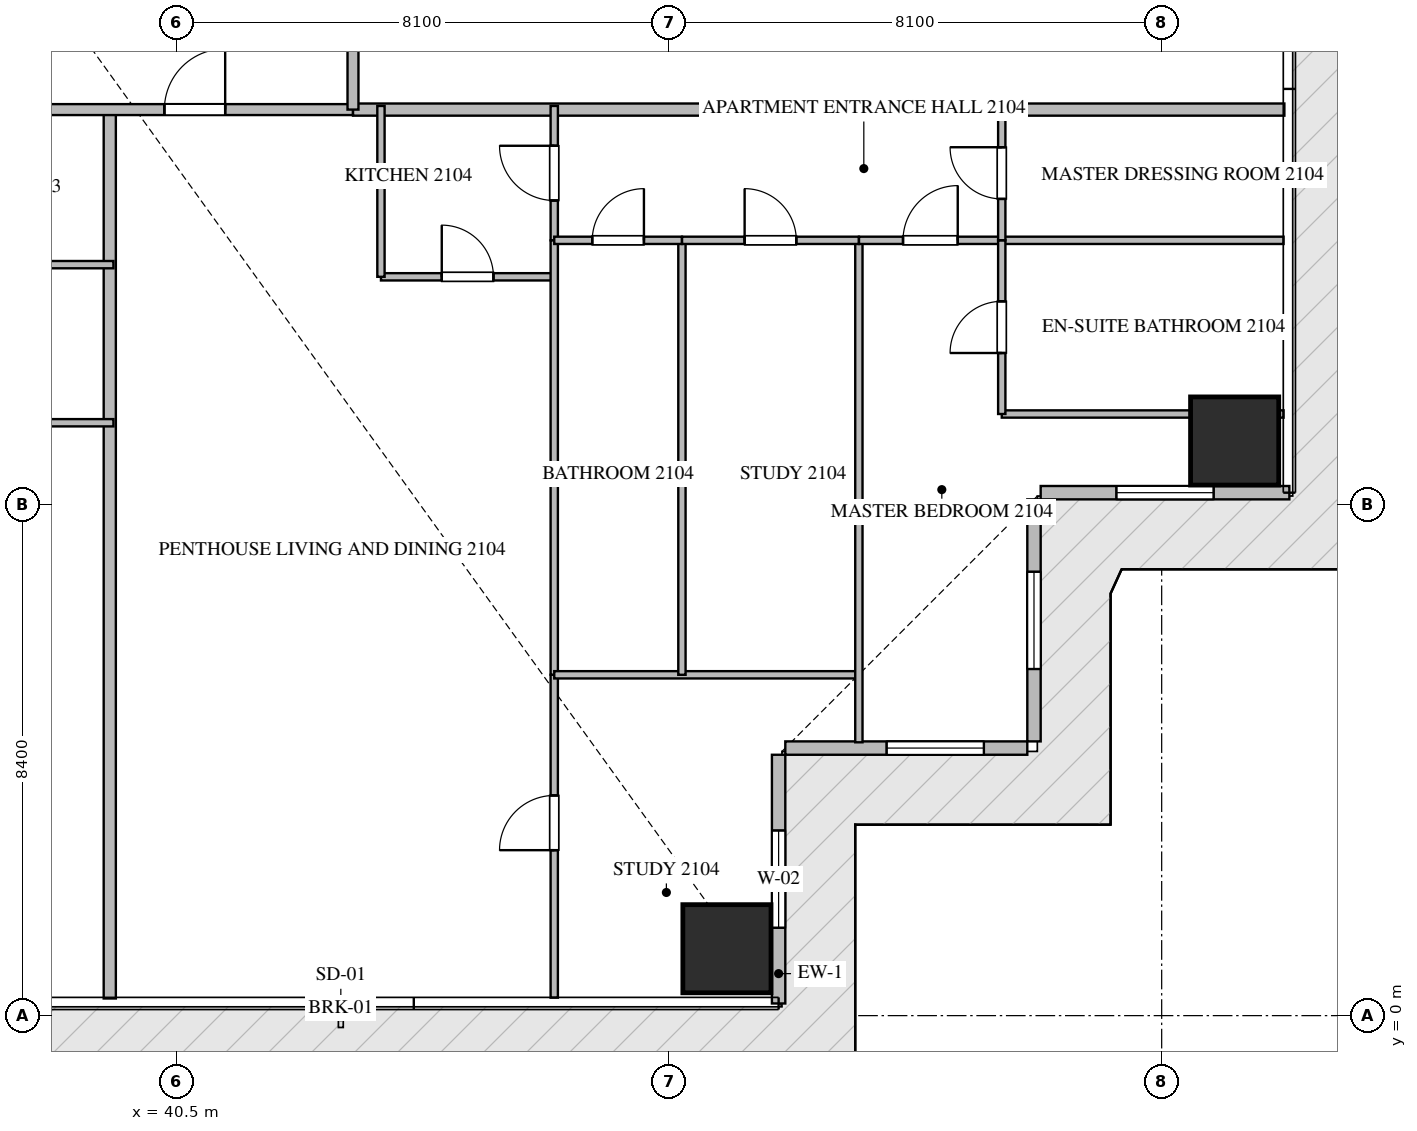
"""IFC4 building model, lengths in metres.
Left out: names, types, materials, properties, quantities, classifications, styles, units other than length and angle.
Written with IfcOpenShell. Run it as: python <this file> out.ifc"""

import sys

from ifc_helpers import new_model, si_unit, direction, frame, frame_2d, origin, origin_2d, place, context, subcontext, project, spatial, rectangle, extrude, source, transform, mapped, element, fill, save


model = new_model("IFC4")
c1 = context("Model", 3, precision=1e-05, world=origin(), true_north=direction((0.0, 1.0)))
c2 = subcontext(c1, "Body", "Model", "MODEL_VIEW")
j1 = project(units=[si_unit("LENGTHUNIT", "METRE"), si_unit("PLANEANGLEUNIT", "RADIAN")], contexts=[c1])
p1 = place(None, origin())
s1 = spatial("IfcSite", under=j1, at=p1, CompositionType="ELEMENT")
p2 = place(p1, origin())
s2 = spatial("IfcBuilding", under=s1, at=p2, CompositionType="ELEMENT")
p3 = place(p2, frame((0.0, 0.0, 86.7)))
s3 = spatial("IfcBuildingStorey", under=s2, at=p3, CompositionType="ELEMENT", Elevation=86.7)
m1 = source(origin(), c2, "Body", "SweptSolid", [
    extrude(rectangle(XDim=1.45, YDim=1.45, at=origin_2d()), origin(), (0.0, 0.0, 1.0), 3.75),
])
for number, where, z_axis, x_axis in (
    (1, (49.55, 1.1, -0.26), (0.0, 0.0, 1.0), (1.0, 0.0, 0.0)),
    (2, (57.9, 9.45, -0.26), (0.0, 0.0, 1.0), (1.0, 0.0, 0.0)),
):
    element("IfcColumn", number, at=place(p3, frame(where, z_axis=z_axis, x_axis=x_axis)), inside=s3, PredefinedType="COLUMN", context=c2, shape_type="MappedRepresentation", body=[
        mapped(m1, transform((0.0, 0.0, 0.0), scale=1.0)),
    ])
p4 = place(p3, frame((50.4, 0.2, 0.0), z_axis=(0.0, 0.0, 1.0), x_axis=(0.0, 1.0, 0.0)))
e3 = element("IfcWall", 3, at=p4, inside=s3, PredefinedType="ELEMENTEDWALL", context=c2, shape_type="SweptSolid", body=[
    extrude(rectangle(XDim=4.09, YDim=0.22, at=frame_2d((2.045, 0.0))), origin(), (0.0, 0.0, 1.0), 3.475),
])
p5 = place(p4, frame((1.245, 0.0, 0.65)))
e4 = element("IfcOpeningElement", 4, at=p5, cuts=e3, PredefinedType="OPENING", context=c2, shape_type="SweptSolid", body=[
    extrude(rectangle(XDim=1.6, YDim=2.1, at=frame_2d((0.8, 1.05))), frame((0.0, 0.12, 0.0), z_axis=(0.0, -1.0, 0.0), x_axis=(1.0, 0.0, 0.0)), (0.0, 0.0, 1.0), 0.24),
])
p6 = place(p3, frame((50.51, 4.4, 0.0), z_axis=(0.0, 0.0, 1.0), x_axis=(1.0, 0.0, 0.0)))
e5 = element("IfcWall", 5, at=p6, inside=s3, PredefinedType="ELEMENTEDWALL", context=c2, shape_type="SweptSolid", body=[
    extrude(rectangle(XDim=3.98, YDim=0.22, at=frame_2d((1.99, 0.0))), origin(), (0.0, 0.0, 1.0), 3.475),
])
p7 = place(p6, frame((1.666, 0.0, 0.65)))
e6 = element("IfcOpeningElement", 6, at=p7, cuts=e5, PredefinedType="OPENING", context=c2, shape_type="SweptSolid", body=[
    extrude(rectangle(XDim=1.6, YDim=2.1, at=frame_2d((0.8, 1.05))), frame((0.0, 0.12, 0.0), z_axis=(0.0, -1.0, 0.0), x_axis=(1.0, 0.0, 0.0)), (0.0, 0.0, 1.0), 0.24),
])
p8 = place(p3, frame((54.6, 4.51, 0.0), z_axis=(0.0, 0.0, 1.0), x_axis=(0.0, 1.0, 0.0)))
e7 = element("IfcWall", 7, at=p8, inside=s3, PredefinedType="ELEMENTEDWALL", context=c2, shape_type="SweptSolid", body=[
    extrude(rectangle(XDim=3.98, YDim=0.22, at=frame_2d((1.99, 0.0))), origin(), (0.0, 0.0, 1.0), 3.475),
])
p9 = place(p8, frame((1.19, 0.0, 0.65)))
e8 = element("IfcOpeningElement", 8, at=p9, cuts=e7, PredefinedType="OPENING", context=c2, shape_type="SweptSolid", body=[
    extrude(rectangle(XDim=1.6, YDim=2.1, at=frame_2d((0.8, 1.05))), frame((0.0, 0.12, 0.0), z_axis=(0.0, -1.0, 0.0), x_axis=(1.0, 0.0, 0.0)), (0.0, 0.0, 1.0), 0.24),
])
p10 = place(p3, frame((54.71, 8.6, 0.0), z_axis=(0.0, 0.0, 1.0), x_axis=(1.0, 0.0, 0.0)))
e9 = element("IfcWall", 9, at=p10, inside=s3, PredefinedType="ELEMENTEDWALL", context=c2, shape_type="SweptSolid", body=[
    extrude(rectangle(XDim=4.09, YDim=0.22, at=frame_2d((2.045, 0.0))), origin(), (0.0, 0.0, 1.0), 3.475),
])
p11 = place(p10, frame((1.245, 0.0, 0.65)))
e10 = element("IfcOpeningElement", 10, at=p11, cuts=e9, PredefinedType="OPENING", context=c2, shape_type="SweptSolid", body=[
    extrude(rectangle(XDim=1.6, YDim=2.1, at=frame_2d((0.8, 1.05))), frame((0.0, 0.12, 0.0), z_axis=(0.0, -1.0, 0.0), x_axis=(1.0, 0.0, 0.0)), (0.0, 0.0, 1.0), 0.24),
])
p12 = place(p3, frame((39.4, 0.282, 0.0), z_axis=(0.0, 0.0, 1.0), x_axis=(0.0, 1.0, 0.0)))
e11 = element("IfcWall", 11, at=p12, inside=s3, PredefinedType="PARTITIONING", context=c2, shape_type="SweptSolid", body=[
    extrude(rectangle(XDim=14.618, YDim=0.2, at=frame_2d((7.309, 0.0))), origin(), (0.0, 0.0, 1.0), 3.49),
])
p13 = place(p3, frame((43.4, 14.9, 0.0), z_axis=(0.0, 0.0, 1.0), x_axis=(1.0, 0.0, 0.0)))
e12 = element("IfcWall", 12, at=p13, inside=s3, PredefinedType="PARTITIONING", context=c2, shape_type="SweptSolid", body=[
    extrude(rectangle(XDim=15.318, YDim=0.2, at=frame_2d((7.659, 0.0))), origin(), (0.0, 0.0, 1.0), 3.49),
])
p14 = place(p3, frame((21.402, 14.9, 0.0), z_axis=(0.0, 0.0, 1.0), x_axis=(1.0, 0.0, 0.0)))
e13 = element("IfcWall", 13, at=p14, inside=s3, PredefinedType="PARTITIONING", context=c2, shape_type="SweptSolid", body=[
    extrude(rectangle(XDim=21.996, YDim=0.18, at=frame_2d((10.998, 0.0))), origin(), (0.0, 0.0, 1.0), 3.49),
])
p15 = place(p14, frame((1.82, 0.0, 0.0)))
e14 = element("IfcOpeningElement", 14, at=p15, cuts=e13, PredefinedType="OPENING", context=c2, shape_type="SweptSolid", body=[
    extrude(rectangle(XDim=1.0, YDim=2.15, at=frame_2d((0.5, 1.075))), frame((0.0, 0.1, 0.0), z_axis=(0.0, -1.0, 0.0), x_axis=(1.0, 0.0, 0.0)), (0.0, 0.0, 1.0), 0.2),
])
p16 = place(p14, frame((5.144, 0.0, 0.0)))
e15 = element("IfcOpeningElement", 15, at=p16, cuts=e13, PredefinedType="OPENING", context=c2, shape_type="SweptSolid", body=[
    extrude(rectangle(XDim=1.0, YDim=2.15, at=frame_2d((0.5, 1.075))), frame((0.0, 0.1, 0.0), z_axis=(0.0, -1.0, 0.0), x_axis=(1.0, 0.0, 0.0)), (0.0, 0.0, 1.0), 0.2),
])
p17 = place(p14, frame((11.758, 0.0, 0.0)))
e16 = element("IfcOpeningElement", 16, at=p17, cuts=e13, PredefinedType="OPENING", context=c2, shape_type="SweptSolid", body=[
    extrude(rectangle(XDim=1.0, YDim=2.15, at=frame_2d((0.5, 1.075))), frame((0.0, 0.1, 0.0), z_axis=(0.0, -1.0, 0.0), x_axis=(1.0, 0.0, 0.0)), (0.0, 0.0, 1.0), 0.2),
])
p18 = place(p14, frame((18.896, 0.0, 0.0)))
e17 = element("IfcOpeningElement", 17, at=p18, cuts=e13, PredefinedType="OPENING", context=c2, shape_type="SweptSolid", body=[
    extrude(rectangle(XDim=1.0, YDim=2.15, at=frame_2d((0.5, 1.075))), frame((0.0, 0.1, 0.0), z_axis=(0.0, -1.0, 0.0), x_axis=(1.0, 0.0, 0.0)), (0.0, 0.0, 1.0), 0.2),
])
p19 = place(p3, frame((43.4, 14.9, 0.0), z_axis=(0.0, 0.0, 1.0), x_axis=(0.0, 1.0, 0.0)))
e18 = element("IfcWall", 18, at=p19, inside=s3, PredefinedType="PARTITIONING", context=c2, shape_type="SweptSolid", body=[
    extrude(rectangle(XDim=20.6, YDim=0.18, at=frame_2d((10.3, 0.0))), origin(), (0.0, 0.0, 1.0), 3.49),
])
p20 = place(p19, frame((1.96, 0.0, 0.0)))
e19 = element("IfcOpeningElement", 19, at=p20, cuts=e18, PredefinedType="OPENING", context=c2, shape_type="SweptSolid", body=[
    extrude(rectangle(XDim=1.0, YDim=2.15, at=frame_2d((0.5, 1.075))), frame((0.0, 0.1, 0.0), z_axis=(0.0, -1.0, 0.0), x_axis=(1.0, 0.0, 0.0)), (0.0, 0.0, 1.0), 0.2),
])
for number, where, z_axis, x_axis in (
    (20, (35.3, 12.35, 0.0), (0.0, 0.0, 1.0), (1.0, 0.0, 0.0)),
    (21, (35.3, 9.75, 0.0), (0.0, 0.0, 1.0), (1.0, 0.0, 0.0)),
):
    element("IfcWall", number, at=place(p3, frame(where, z_axis=z_axis, x_axis=x_axis)), inside=s3, PredefinedType="PARTITIONING", context=c2, shape_type="SweptSolid", body=[
        extrude(rectangle(XDim=4.16, YDim=0.12, at=frame_2d((2.08, 0.0))), origin(), (0.0, 0.0, 1.0), 3.49),
    ])
p21 = place(p3, frame((43.86, 12.15, 0.0), z_axis=(0.0, 0.0, 1.0), x_axis=(1.0, 0.0, 0.0)))
e22 = element("IfcWall", 22, at=p21, inside=s3, PredefinedType="PARTITIONING", context=c2, shape_type="SweptSolid", body=[
    extrude(rectangle(XDim=2.85, YDim=0.12, at=frame_2d((1.425, 0.0))), origin(), (0.0, 0.0, 1.0), 3.49),
])
p22 = place(p21, frame((1.0, 0.0, 0.0)))
e23 = element("IfcOpeningElement", 23, at=p22, cuts=e22, PredefinedType="OPENING", context=c2, shape_type="SweptSolid", body=[
    extrude(rectangle(XDim=0.85, YDim=2.1, at=frame_2d((0.425, 1.05))), frame((0.0, 0.07, 0.0), z_axis=(0.0, -1.0, 0.0), x_axis=(1.0, 0.0, 0.0)), (0.0, 0.0, 1.0), 0.14),
])
p23 = place(p3, frame((43.86, 12.15, 0.0), z_axis=(0.0, 0.0, 1.0), x_axis=(0.0, 1.0, 0.0)))
e24 = element("IfcWall", 24, at=p23, inside=s3, PredefinedType="PARTITIONING", context=c2, shape_type="SweptSolid", body=[
    extrude(rectangle(XDim=2.81, YDim=0.12, at=frame_2d((1.405, 0.0))), origin(), (0.0, 0.0, 1.0), 3.49),
])
p24 = place(p3, frame((46.71, 12.75, 0.0), z_axis=(0.0, 0.0, 1.0), x_axis=(0.0, 1.0, 0.0)))
e25 = element("IfcWall", 25, at=p24, inside=s3, PredefinedType="PARTITIONING", context=c2, shape_type="SweptSolid", body=[
    extrude(rectangle(XDim=2.21, YDim=0.12, at=frame_2d((1.105, 0.0))), origin(), (0.0, 0.0, 1.0), 3.49),
])
p25 = place(p24, frame((0.655, 0.0, 0.0)))
e26 = element("IfcOpeningElement", 26, at=p25, cuts=e25, PredefinedType="OPENING", context=c2, shape_type="SweptSolid", body=[
    extrude(rectangle(XDim=0.9, YDim=2.1, at=frame_2d((0.45, 1.05))), frame((0.0, 0.07, 0.0), z_axis=(0.0, -1.0, 0.0), x_axis=(1.0, 0.0, 0.0)), (0.0, 0.0, 1.0), 0.14),
])
p26 = place(p3, frame((46.71, 0.295, 0.0), z_axis=(0.0, 0.0, 1.0), x_axis=(0.0, 1.0, 0.0)))
e27 = element("IfcWall", 27, at=p26, inside=s3, PredefinedType="PARTITIONING", context=c2, shape_type="SweptSolid", body=[
    extrude(rectangle(XDim=5.31, YDim=0.12, at=frame_2d((2.655, 0.0))), origin(), (0.0, 0.0, 1.0), 3.49),
])
p27 = place(p26, frame((2.426, 0.0, 0.0)))
e28 = element("IfcOpeningElement", 28, at=p27, cuts=e27, PredefinedType="OPENING", context=c2, shape_type="SweptSolid", body=[
    extrude(rectangle(XDim=0.9, YDim=2.1, at=frame_2d((0.45, 1.05))), frame((0.0, 0.07, 0.0), z_axis=(0.0, -1.0, 0.0), x_axis=(1.0, 0.0, 0.0)), (0.0, 0.0, 1.0), 0.14),
])
p28 = place(p3, frame((46.71, 5.607, 0.0), z_axis=(0.0, 0.0, 1.0), x_axis=(0.0, 1.0, 0.0)))
e29 = element("IfcWall", 29, at=p28, inside=s3, PredefinedType="PARTITIONING", context=c2, shape_type="SweptSolid", body=[
    extrude(rectangle(XDim=7.141, YDim=0.12, at=frame_2d((3.571, 0.0))), origin(), (0.0, 0.0, 1.0), 3.49),
])
p29 = place(p3, frame((46.71, 5.605, 0.0), z_axis=(0.0, 0.0, 1.0), x_axis=(1.0, 0.0, 0.0)))
e30 = element("IfcWall", 30, at=p29, inside=s3, PredefinedType="PARTITIONING", context=c2, shape_type="SweptSolid", body=[
    extrude(rectangle(XDim=5.01, YDim=0.12, at=frame_2d((2.505, 0.0))), origin(), (0.0, 0.0, 1.0), 3.49),
])
p30 = place(p3, frame((51.72, 4.495, 0.0), z_axis=(0.0, 0.0, 1.0), x_axis=(0.0, 1.0, 0.0)))
e31 = element("IfcWall", 31, at=p30, inside=s3, PredefinedType="PARTITIONING", context=c2, shape_type="SweptSolid", body=[
    extrude(rectangle(XDim=8.255, YDim=0.12, at=frame_2d((4.127, 0.0))), origin(), (0.0, 0.0, 1.0), 3.49),
])
p31 = place(p3, frame((48.81, 5.605, 0.0), z_axis=(0.0, 0.0, 1.0), x_axis=(0.0, 1.0, 0.0)))
e32 = element("IfcWall", 32, at=p31, inside=s3, PredefinedType="PARTITIONING", context=c2, shape_type="SweptSolid", body=[
    extrude(rectangle(XDim=7.145, YDim=0.12, at=frame_2d((3.573, 0.0))), origin(), (0.0, 0.0, 1.0), 3.49),
])
p32 = place(p3, frame((46.71, 12.75, 0.0), z_axis=(0.0, 0.0, 1.0), x_axis=(1.0, 0.0, 0.0)))
e33 = element("IfcWall", 33, at=p32, inside=s3, PredefinedType="PARTITIONING", context=c2, shape_type="SweptSolid", body=[
    extrude(rectangle(XDim=2.1, YDim=0.12, at=frame_2d((1.05, 0.0))), origin(), (0.0, 0.0, 1.0), 3.49),
])
p33 = place(p32, frame((0.625, 0.0, 0.0)))
e34 = element("IfcOpeningElement", 34, at=p33, cuts=e33, PredefinedType="OPENING", context=c2, shape_type="SweptSolid", body=[
    extrude(rectangle(XDim=0.85, YDim=2.1, at=frame_2d((0.425, 1.05))), frame((0.0, 0.07, 0.0), z_axis=(0.0, -1.0, 0.0), x_axis=(1.0, 0.0, 0.0)), (0.0, 0.0, 1.0), 0.14),
])
p34 = place(p3, frame((48.812, 12.75, 0.0), z_axis=(0.0, 0.0, 1.0), x_axis=(1.0, 0.0, 0.0)))
e35 = element("IfcWall", 35, at=p34, inside=s3, PredefinedType="PARTITIONING", context=c2, shape_type="SweptSolid", body=[
    extrude(rectangle(XDim=2.908, YDim=0.12, at=frame_2d((1.454, 0.0))), origin(), (0.0, 0.0, 1.0), 3.49),
])
p35 = place(p34, frame((1.029, 0.0, 0.0)))
e36 = element("IfcOpeningElement", 36, at=p35, cuts=e35, PredefinedType="OPENING", context=c2, shape_type="SweptSolid", body=[
    extrude(rectangle(XDim=0.85, YDim=2.1, at=frame_2d((0.425, 1.05))), frame((0.0, 0.07, 0.0), z_axis=(0.0, -1.0, 0.0), x_axis=(1.0, 0.0, 0.0)), (0.0, 0.0, 1.0), 0.14),
])
p36 = place(p3, frame((51.722, 12.75, 0.0), z_axis=(0.0, 0.0, 1.0), x_axis=(1.0, 0.0, 0.0)))
e37 = element("IfcWall", 37, at=p36, inside=s3, PredefinedType="PARTITIONING", context=c2, shape_type="SweptSolid", body=[
    extrude(rectangle(XDim=2.348, YDim=0.12, at=frame_2d((1.174, 0.0))), origin(), (0.0, 0.0, 1.0), 3.49),
])
p37 = place(p36, frame((0.724, 0.0, 0.0)))
e38 = element("IfcOpeningElement", 38, at=p37, cuts=e37, PredefinedType="OPENING", context=c2, shape_type="SweptSolid", body=[
    extrude(rectangle(XDim=0.9, YDim=2.1, at=frame_2d((0.45, 1.05))), frame((0.0, 0.07, 0.0), z_axis=(0.0, -1.0, 0.0), x_axis=(1.0, 0.0, 0.0)), (0.0, 0.0, 1.0), 0.14),
])
p38 = place(p3, frame((54.07, 9.894, 0.0), z_axis=(0.0, 0.0, 1.0), x_axis=(1.0, 0.0, 0.0)))
e39 = element("IfcWall", 39, at=p38, inside=s3, PredefinedType="PARTITIONING", context=c2, shape_type="SweptSolid", body=[
    extrude(rectangle(XDim=4.635, YDim=0.12, at=frame_2d((2.317, 0.0))), origin(), (0.0, 0.0, 1.0), 3.49),
])
p39 = place(p3, frame((54.072, 12.75, 0.0), z_axis=(0.0, 0.0, 1.0), x_axis=(1.0, 0.0, 0.0)))
e40 = element("IfcWall", 40, at=p39, inside=s3, PredefinedType="PARTITIONING", context=c2, shape_type="SweptSolid", body=[
    extrude(rectangle(XDim=4.633, YDim=0.12, at=frame_2d((2.316, 0.0))), origin(), (0.0, 0.0, 1.0), 3.49),
])
p40 = place(p3, frame((54.07, 9.894, 0.0), z_axis=(0.0, 0.0, 1.0), x_axis=(0.0, 1.0, 0.0)))
e41 = element("IfcWall", 41, at=p40, inside=s3, PredefinedType="PARTITIONING", context=c2, shape_type="SweptSolid", body=[
    extrude(rectangle(XDim=2.856, YDim=0.12, at=frame_2d((1.428, 0.0))), origin(), (0.0, 0.0, 1.0), 3.49),
])
p41 = place(p40, frame((1.003, 0.0, 0.0)))
e42 = element("IfcOpeningElement", 42, at=p41, cuts=e41, PredefinedType="OPENING", context=c2, shape_type="SweptSolid", body=[
    extrude(rectangle(XDim=0.85, YDim=2.1, at=frame_2d((0.425, 1.05))), frame((0.0, 0.07, 0.0), z_axis=(0.0, -1.0, 0.0), x_axis=(1.0, 0.0, 0.0)), (0.0, 0.0, 1.0), 0.14),
])
p42 = place(p3, frame((54.07, 12.752, 0.0), z_axis=(0.0, 0.0, 1.0), x_axis=(0.0, 1.0, 0.0)))
e43 = element("IfcWall", 43, at=p42, inside=s3, PredefinedType="PARTITIONING", context=c2, shape_type="SweptSolid", body=[
    extrude(rectangle(XDim=2.208, YDim=0.12, at=frame_2d((1.104, 0.0))), origin(), (0.0, 0.0, 1.0), 3.49),
])
p43 = place(p42, frame((0.679, 0.0, 0.0)))
e44 = element("IfcOpeningElement", 44, at=p43, cuts=e43, PredefinedType="OPENING", context=c2, shape_type="SweptSolid", body=[
    extrude(rectangle(XDim=0.85, YDim=2.1, at=frame_2d((0.425, 1.05))), frame((0.0, 0.07, 0.0), z_axis=(0.0, -1.0, 0.0), x_axis=(1.0, 0.0, 0.0)), (0.0, 0.0, 1.0), 0.14),
])
m2 = source(origin(), c2, "Body", "SweptSolid", [
    extrude(rectangle(XDim=1.6, YDim=2.1, at=frame_2d((0.8, 1.05))), frame((0.0, 0.03, 0.0), z_axis=(0.0, -1.0, 0.0), x_axis=(1.0, 0.0, 0.0)), (0.0, 0.0, 1.0), 0.06),
])
p44 = place(p5, origin())
e45 = element("IfcWindow", 45, at=p44, inside=s3, PartitioningType="SINGLE_PANEL", PredefinedType="WINDOW", context=c2, shape_type="MappedRepresentation", body=[
    mapped(m2, transform((0.0, 0.0, 0.0), scale=1.0)),
])
fill(e4, e45)
p45 = place(p7, origin())
e46 = element("IfcWindow", 46, at=p45, inside=s3, PartitioningType="SINGLE_PANEL", PredefinedType="WINDOW", context=c2, shape_type="MappedRepresentation", body=[
    mapped(m2, transform((0.0, 0.0, 0.0), scale=1.0)),
])
fill(e6, e46)
p46 = place(p9, origin())
e47 = element("IfcWindow", 47, at=p46, inside=s3, PartitioningType="SINGLE_PANEL", PredefinedType="WINDOW", context=c2, shape_type="MappedRepresentation", body=[
    mapped(m2, transform((0.0, 0.0, 0.0), scale=1.0)),
])
fill(e8, e47)
p47 = place(p11, origin())
e48 = element("IfcWindow", 48, at=p47, inside=s3, PartitioningType="SINGLE_PANEL", PredefinedType="WINDOW", context=c2, shape_type="MappedRepresentation", body=[
    mapped(m2, transform((0.0, 0.0, 0.0), scale=1.0)),
])
fill(e10, e48)
m3 = source(origin(), c2, "Body", "SweptSolid", [
    extrude(rectangle(XDim=1.0, YDim=2.15, at=frame_2d((0.5, 1.075))), frame((0.0, 0.025, 0.0), z_axis=(0.0, -1.0, 0.0), x_axis=(1.0, 0.0, 0.0)), (0.0, 0.0, 1.0), 0.05),
])
p48 = place(p18, origin())
e49 = element("IfcDoor", 49, at=p48, inside=s3, OperationType="SINGLE_SWING_RIGHT", PredefinedType="DOOR", context=c2, shape_type="MappedRepresentation", body=[
    mapped(m3, transform((0.0, 0.0, 0.0), scale=1.0)),
])
fill(e17, e49)
m4 = source(origin(), c2, "Body", "SweptSolid", [
    extrude(rectangle(XDim=0.85, YDim=2.1, at=frame_2d((0.425, 1.05))), frame((0.0, 0.025, 0.0), z_axis=(0.0, -1.0, 0.0), x_axis=(1.0, 0.0, 0.0)), (0.0, 0.0, 1.0), 0.05),
])
p49 = place(p22, origin())
e50 = element("IfcDoor", 50, at=p49, inside=s3, OperationType="SINGLE_SWING_LEFT", PredefinedType="DOOR", context=c2, shape_type="MappedRepresentation", body=[
    mapped(m4, transform((0.0, 0.0, 0.0), scale=1.0)),
])
fill(e23, e50)
m5 = source(origin(), c2, "Body", "SweptSolid", [
    extrude(rectangle(XDim=0.9, YDim=2.1, at=frame_2d((0.45, 1.05))), frame((0.0, 0.025, 0.0), z_axis=(0.0, -1.0, 0.0), x_axis=(1.0, 0.0, 0.0)), (0.0, 0.0, 1.0), 0.05),
])
p50 = place(p25, origin())
e51 = element("IfcDoor", 51, at=p50, inside=s3, OperationType="SINGLE_SWING_RIGHT", PredefinedType="DOOR", context=c2, shape_type="MappedRepresentation", body=[
    mapped(m5, transform((0.0, 0.0, 0.0), scale=1.0)),
])
fill(e26, e51)
p51 = place(p27, origin())
e52 = element("IfcDoor", 52, at=p51, inside=s3, OperationType="SINGLE_SWING_LEFT", PredefinedType="DOOR", context=c2, shape_type="MappedRepresentation", body=[
    mapped(m5, transform((0.0, 0.0, 0.0), scale=1.0)),
])
fill(e28, e52)
p52 = place(p33, origin())
e53 = element("IfcDoor", 53, at=p52, inside=s3, OperationType="SINGLE_SWING_RIGHT", PredefinedType="DOOR", context=c2, shape_type="MappedRepresentation", body=[
    mapped(m4, transform((0.0, 0.0, 0.0), scale=1.0)),
])
fill(e34, e53)
p53 = place(p35, origin())
e54 = element("IfcDoor", 54, at=p53, inside=s3, OperationType="SINGLE_SWING_LEFT", PredefinedType="DOOR", context=c2, shape_type="MappedRepresentation", body=[
    mapped(m4, transform((0.0, 0.0, 0.0), scale=1.0)),
])
fill(e36, e54)
p54 = place(p37, origin())
e55 = element("IfcDoor", 55, at=p54, inside=s3, OperationType="SINGLE_SWING_RIGHT", PredefinedType="DOOR", context=c2, shape_type="MappedRepresentation", body=[
    mapped(m5, transform((0.0, 0.0, 0.0), scale=1.0)),
])
fill(e38, e55)
p55 = place(p41, origin())
e56 = element("IfcDoor", 56, at=p55, inside=s3, OperationType="SINGLE_SWING_LEFT", PredefinedType="DOOR", context=c2, shape_type="MappedRepresentation", body=[
    mapped(m4, transform((0.0, 0.0, 0.0), scale=1.0)),
])
fill(e42, e56)
p56 = place(p43, origin())
e57 = element("IfcDoor", 57, at=p56, inside=s3, OperationType="SINGLE_SWING_RIGHT", PredefinedType="DOOR", context=c2, shape_type="MappedRepresentation", body=[
    mapped(m4, transform((0.0, 0.0, 0.0), scale=1.0)),
])
fill(e44, e57)
save(model, sys.argv[1])
